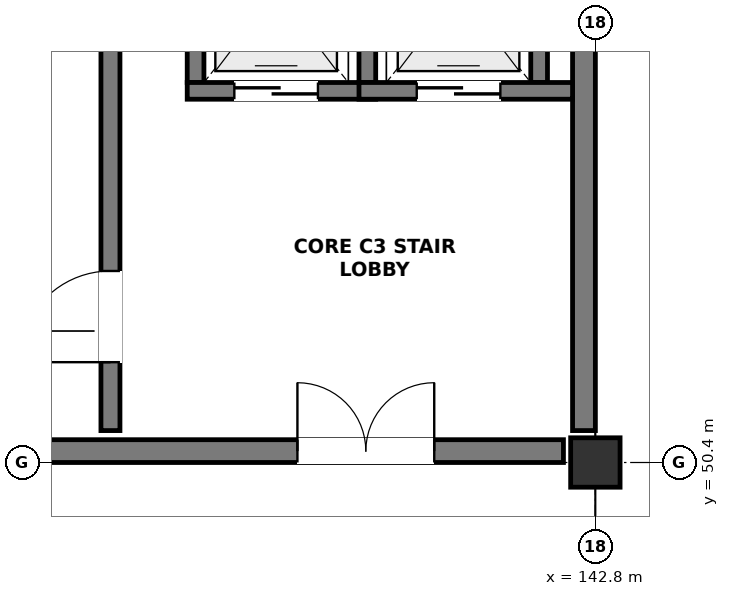
"""IFC4 building model, lengths in metres.
Left out: names, types, materials, properties, quantities, classifications, styles, units other than length and angle.
Written with IfcOpenShell. Run it as: python <this file> out.ifc"""

import sys

from ifc_helpers import new_model, si_unit, direction, frame, frame_2d, origin, origin_2d, place, context, subcontext, project, spatial, rectangle, extrude, element, fill, save


model = new_model("IFC4")
c1 = context("Model", 3, precision=1e-05, world=origin(), true_north=direction((0.0, 1.0)))
c2 = subcontext(c1, "Body", "Model", "MODEL_VIEW")
j1 = project(units=[si_unit("LENGTHUNIT", "METRE"), si_unit("PLANEANGLEUNIT", "RADIAN")], contexts=[c1])
p1 = place(None, origin())
s1 = spatial("IfcSite", under=j1, at=p1, CompositionType="ELEMENT")
p2 = place(p1, origin())
s2 = spatial("IfcBuilding", under=s1, at=p2, CompositionType="ELEMENT")
p3 = place(p2, frame((0.0, 0.0, 5.1)))
s3 = spatial("IfcBuildingStorey", under=s2, at=p3, CompositionType="ELEMENT", Elevation=5.1)
p4 = place(p3, frame((142.8, 50.4, 0.0), z_axis=(0.0, 0.0, 1.0), x_axis=(1.0, 0.0, 0.0)))
e1 = element("IfcColumn", 1, at=p4, inside=s3, PredefinedType="COLUMN", context=c2, shape_type="SweptSolid", body=[
    extrude(rectangle(XDim=0.65, YDim=0.65, at=origin_2d()), origin(), (0.0, 0.0, 1.0), 4.8),
])
p5 = place(p3, frame((126.45, 50.55, 0.0), z_axis=(0.0, 0.0, 1.0), x_axis=(1.0, 0.0, 0.0)))
e2 = element("IfcWall", 2, at=p5, inside=s3, PredefinedType="SHEAR", context=c2, shape_type="SweptSolid", body=[
    extrude(rectangle(XDim=15.93, YDim=0.3, at=frame_2d((7.965, 0.0))), origin(), (0.0, 0.0, 1.0), 4.5),
])
p6 = place(p5, frame((12.43, 0.0, 0.0)))
e3 = element("IfcOpeningElement", 3, at=p6, cuts=e2, PredefinedType="OPENING", context=c2, shape_type="SweptSolid", body=[
    extrude(rectangle(XDim=1.8, YDim=2.2, at=frame_2d((0.9, 1.1))), frame((0.0, 0.162, 0.0), z_axis=(0.0, -1.0, 0.0), x_axis=(1.0, 0.0, 0.0)), (0.0, 0.0, 1.0), 0.324),
])
p7 = place(p3, frame((142.65, 50.82, 0.0), z_axis=(0.0, 0.0, 1.0), x_axis=(0.0, 1.0, 0.0)))
e4 = element("IfcWall", 4, at=p7, inside=s3, PredefinedType="SHEAR", context=c2, shape_type="SweptSolid", body=[
    extrude(rectangle(XDim=7.56, YDim=0.3, at=frame_2d((3.78, 0.0))), origin(), (0.0, 0.0, 1.0), 4.5),
])
p8 = place(p3, frame((136.42, 50.82, 0.0), z_axis=(0.0, 0.0, 1.0), x_axis=(0.0, 1.0, 0.0)))
e5 = element("IfcWall", 5, at=p8, inside=s3, PredefinedType="SHEAR", context=c2, shape_type="SweptSolid", body=[
    extrude(rectangle(XDim=7.56, YDim=0.25, at=frame_2d((3.78, 0.0))), origin(), (0.0, 0.0, 1.0), 4.5),
])
p9 = place(p8, frame((0.9, 0.0, 0.0)))
e6 = element("IfcOpeningElement", 6, at=p9, cuts=e5, PredefinedType="OPENING", context=c2, shape_type="SweptSolid", body=[
    extrude(rectangle(XDim=1.2, YDim=2.2, at=frame_2d((0.6, 1.1))), frame((0.0, 0.137, 0.0), z_axis=(0.0, -1.0, 0.0), x_axis=(1.0, 0.0, 0.0)), (0.0, 0.0, 1.0), 0.274),
])
p10 = place(p3, frame((137.54, 55.4, 0.0), z_axis=(0.0, 0.0, 1.0), x_axis=(0.0, 1.0, 0.0)))
e7 = element("IfcWall", 7, at=p10, inside=s3, PredefinedType="SOLIDWALL", context=c2, shape_type="SweptSolid", body=[
    extrude(rectangle(XDim=2.4, YDim=0.22, at=frame_2d((1.2, 0.0))), origin(), (0.0, 0.0, 1.0), 4.5),
])
p11 = place(p3, frame((137.43, 55.29, 0.0), z_axis=(0.0, 0.0, 1.0), x_axis=(1.0, 0.0, 0.0)))
e8 = element("IfcWall", 8, at=p11, inside=s3, PredefinedType="SOLIDWALL", context=c2, shape_type="SweptSolid", body=[
    extrude(rectangle(XDim=2.48, YDim=0.22, at=frame_2d((1.24, 0.0))), origin(), (0.0, 0.0, 1.0), 4.5),
])
p12 = place(p11, frame((0.62, 0.0, 0.0)))
e9 = element("IfcOpeningElement", 9, at=p12, cuts=e8, PredefinedType="OPENING", context=c2, shape_type="SweptSolid", body=[
    extrude(rectangle(XDim=1.1, YDim=2.15, at=frame_2d((0.55, 1.075))), frame((0.0, 0.122, 0.0), z_axis=(0.0, -1.0, 0.0), x_axis=(1.0, 0.0, 0.0)), (0.0, 0.0, 1.0), 0.244),
])
for number, where, z_axis, x_axis in (
    (10, (139.8, 55.4, 0.0), (0.0, 0.0, 1.0), (0.0, 1.0, 0.0)),
    (11, (142.06, 55.4, 0.0), (0.0, 0.0, 1.0), (0.0, 1.0, 0.0)),
):
    element("IfcWall", number, at=place(p3, frame(where, z_axis=z_axis, x_axis=x_axis)), inside=s3, PredefinedType="SOLIDWALL", context=c2, shape_type="SweptSolid", body=[
        extrude(rectangle(XDim=2.4, YDim=0.22, at=frame_2d((1.2, 0.0))), origin(), (0.0, 0.0, 1.0), 4.5),
    ])
p13 = place(p3, frame((139.69, 55.29, 0.0), z_axis=(0.0, 0.0, 1.0), x_axis=(1.0, 0.0, 0.0)))
e12 = element("IfcWall", 12, at=p13, inside=s3, PredefinedType="SOLIDWALL", context=c2, shape_type="SweptSolid", body=[
    extrude(rectangle(XDim=2.81, YDim=0.22, at=frame_2d((1.405, 0.0))), origin(), (0.0, 0.0, 1.0), 4.5),
])
p14 = place(p13, frame((0.76, 0.0, 0.0)))
e13 = element("IfcOpeningElement", 13, at=p14, cuts=e12, PredefinedType="OPENING", context=c2, shape_type="SweptSolid", body=[
    extrude(rectangle(XDim=1.1, YDim=2.15, at=frame_2d((0.55, 1.075))), frame((0.0, 0.122, 0.0), z_axis=(0.0, -1.0, 0.0), x_axis=(1.0, 0.0, 0.0)), (0.0, 0.0, 1.0), 0.244),
])
p15 = place(p6, origin())
e14 = element("IfcDoor", 14, at=p15, inside=s3, OperationType="DOUBLE_DOOR_SINGLE_SWING", PredefinedType="DOOR", context=c2, shape_type="SweptSolid", body=[
    extrude(rectangle(XDim=1.8, YDim=2.2, at=frame_2d((0.9, 1.1))), frame((0.0, 0.025, 0.0), z_axis=(0.0, -1.0, 0.0), x_axis=(1.0, 0.0, 0.0)), (0.0, 0.0, 1.0), 0.05),
])
fill(e3, e14)
p16 = place(p9, origin())
e15 = element("IfcDoor", 15, at=p16, inside=s3, OperationType="SINGLE_SWING_LEFT", PredefinedType="DOOR", context=c2, shape_type="SweptSolid", body=[
    extrude(rectangle(XDim=1.2, YDim=2.2, at=frame_2d((0.6, 1.1))), frame((0.0, 0.025, 0.0), z_axis=(0.0, -1.0, 0.0), x_axis=(1.0, 0.0, 0.0)), (0.0, 0.0, 1.0), 0.05),
])
fill(e6, e15)
p17 = place(p12, origin())
e16 = element("IfcDoor", 16, at=p17, inside=s3, OperationType="DOUBLE_DOOR_SLIDING", PredefinedType="DOOR", context=c2, shape_type="SweptSolid", body=[
    extrude(rectangle(XDim=1.1, YDim=2.15, at=frame_2d((0.55, 1.075))), frame((0.0, 0.025, 0.0), z_axis=(0.0, -1.0, 0.0), x_axis=(1.0, 0.0, 0.0)), (0.0, 0.0, 1.0), 0.05),
])
fill(e9, e16)
p18 = place(p14, origin())
e17 = element("IfcDoor", 17, at=p18, inside=s3, OperationType="DOUBLE_DOOR_SLIDING", PredefinedType="DOOR", context=c2, shape_type="SweptSolid", body=[
    extrude(rectangle(XDim=1.1, YDim=2.15, at=frame_2d((0.55, 1.075))), frame((0.0, 0.025, 0.0), z_axis=(0.0, -1.0, 0.0), x_axis=(1.0, 0.0, 0.0)), (0.0, 0.0, 1.0), 0.05),
])
fill(e13, e17)
save(model, sys.argv[1])
